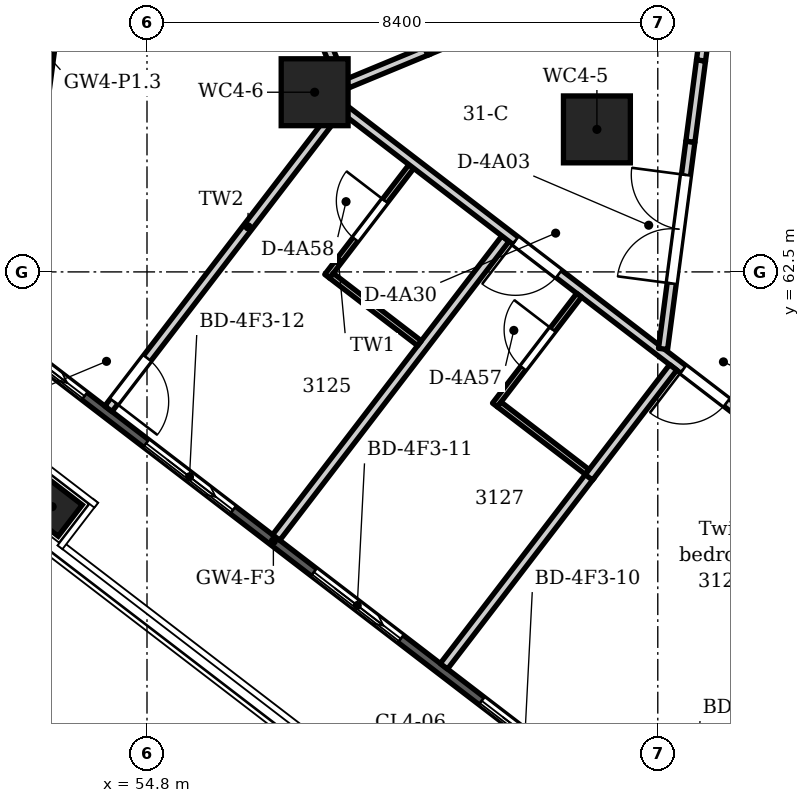
"""IFC4 building model, lengths in metres.
Left out: names, types, materials, properties, quantities, classifications, styles, units other than length and angle.
Written with IfcOpenShell. Run it as: python <this file> out.ifc"""

import sys

from ifc_helpers import new_model, si_unit, direction, frame, frame_2d, origin, origin_2d, place, context, subcontext, project, spatial, polyline, rectangle, circle, outline, extrude, element, fill, save


model = new_model("IFC4")
c1 = context("Model", 3, precision=1e-05, world=origin(), true_north=direction((0.0, 1.0)))
c2 = subcontext(c1, "Body", "Model", "MODEL_VIEW")
j1 = project(units=[si_unit("LENGTHUNIT", "METRE"), si_unit("PLANEANGLEUNIT", "RADIAN")], contexts=[c1])
p1 = place(None, origin())
s1 = spatial("IfcSite", under=j1, at=p1, CompositionType="ELEMENT")
p2 = place(p1, origin())
s2 = spatial("IfcBuilding", under=s1, at=p2, CompositionType="ELEMENT")
p3 = place(p2, frame((0.0, 0.0, 124.2)))
s3 = spatial("IfcBuildingStorey", under=s2, at=p3, CompositionType="ELEMENT", Elevation=124.2)
p4 = place(p3, frame((53.24, 58.639, -0.35), z_axis=(0.0, 0.0, 1.0), x_axis=(-0.793353340291, 0.608761429009, 0.0)))
e1 = element("IfcColumn", 1, at=p4, inside=s3, PredefinedType="COLUMN", context=c2, shape_type="SweptSolid", body=[
    extrude(rectangle(XDim=0.75, YDim=0.65, at=origin_2d()), origin(), (0.0, 0.0, 1.0), 3.95),
])
for number, where, z_axis, x_axis in (
    (2, (62.199, 64.844, -0.35), (0.0, 0.0, 1.0), (1.0, 0.0, 0.0)),
    (3, (57.557, 65.455, -0.35), (0.0, 0.0, 1.0), (1.0, 0.0, 0.0)),
):
    element("IfcColumn", number, at=place(p3, frame(where, z_axis=z_axis, x_axis=x_axis)), inside=s3, PredefinedType="COLUMN", context=c2, shape_type="SweptSolid", body=[
        extrude(circle(Radius=0.55, at=origin_2d()), origin(), (0.0, 0.0, 1.0), 3.95),
    ])
p5 = place(p3, frame((53.059, 65.038, 0.0), z_axis=(0.0, 0.0, 1.0), x_axis=(0.130492404742, 0.991449308994, 0.0)))
e4 = element("IfcWall", 4, at=p5, inside=s3, PredefinedType="SOLIDWALL", context=c2, shape_type="SweptSolid", body=[
    extrude(outline(polyline([(0.0, -0.075), (2.0, -0.075), (2.0, 0.075), (0.0, 0.075), (0.0, -0.075)])), origin(), (0.0, 0.0, 1.0), 3.3),
])
p6 = place(p3, frame((87.225, 34.786, 0.0), z_axis=(0.0, 0.0, 1.0), x_axis=(-0.793353605974, 0.608761082764, 0.0)))
e5 = element("IfcWall", 5, at=p6, inside=s3, PredefinedType="SOLIDWALL", context=c2, shape_type="SweptSolid", body=[
    extrude(outline(polyline([(0.149, 0.075), (0.149, -0.075), (45.057, -0.075), (45.057, 0.075), (0.149, 0.075)])), origin(), (0.0, 0.0, 1.0), 3.3),
])
p7 = place(p6, frame((1.239, 0.0, 0.0)))
e6 = element("IfcOpeningElement", 6, at=p7, cuts=e5, PredefinedType="OPENING", context=c2, shape_type="SweptSolid", body=[
    extrude(rectangle(XDim=1.8, YDim=2.6, at=frame_2d((0.9, 1.3))), frame((0.0, 0.085, 0.0), z_axis=(0.0, -1.0, 0.0), x_axis=(1.0, 0.0, 0.0)), (0.0, 0.0, 1.0), 0.17),
])
p8 = place(p6, frame((4.316, 0.0, 0.0)))
e7 = element("IfcOpeningElement", 7, at=p8, cuts=e5, PredefinedType="OPENING", context=c2, shape_type="SweptSolid", body=[
    extrude(rectangle(XDim=1.8, YDim=2.6, at=frame_2d((0.9, 1.3))), frame((0.0, 0.085, 0.0), z_axis=(0.0, -1.0, 0.0), x_axis=(1.0, 0.0, 0.0)), (0.0, 0.0, 1.0), 0.17),
])
p9 = place(p6, frame((7.793, 0.0, 0.0)))
e8 = element("IfcOpeningElement", 8, at=p9, cuts=e5, PredefinedType="OPENING", context=c2, shape_type="SweptSolid", body=[
    extrude(rectangle(XDim=1.8, YDim=2.6, at=frame_2d((0.9, 1.3))), frame((0.0, 0.085, 0.0), z_axis=(0.0, -1.0, 0.0), x_axis=(1.0, 0.0, 0.0)), (0.0, 0.0, 1.0), 0.17),
])
p10 = place(p6, frame((11.271, 0.0, 0.0)))
e9 = element("IfcOpeningElement", 9, at=p10, cuts=e5, PredefinedType="OPENING", context=c2, shape_type="SweptSolid", body=[
    extrude(rectangle(XDim=1.8, YDim=2.6, at=frame_2d((0.9, 1.3))), frame((0.0, 0.085, 0.0), z_axis=(0.0, -1.0, 0.0), x_axis=(1.0, 0.0, 0.0)), (0.0, 0.0, 1.0), 0.17),
])
p11 = place(p6, frame((14.748, 0.0, 0.0)))
e10 = element("IfcOpeningElement", 10, at=p11, cuts=e5, PredefinedType="OPENING", context=c2, shape_type="SweptSolid", body=[
    extrude(rectangle(XDim=1.8, YDim=2.6, at=frame_2d((0.9, 1.3))), frame((0.0, 0.085, 0.0), z_axis=(0.0, -1.0, 0.0), x_axis=(1.0, 0.0, 0.0)), (0.0, 0.0, 1.0), 0.17),
])
p12 = place(p6, frame((18.226, 0.0, 0.0)))
e11 = element("IfcOpeningElement", 11, at=p12, cuts=e5, PredefinedType="OPENING", context=c2, shape_type="SweptSolid", body=[
    extrude(rectangle(XDim=1.8, YDim=2.6, at=frame_2d((0.9, 1.3))), frame((0.0, 0.085, 0.0), z_axis=(0.0, -1.0, 0.0), x_axis=(1.0, 0.0, 0.0)), (0.0, 0.0, 1.0), 0.17),
])
p13 = place(p6, frame((21.703, 0.0, 0.0)))
e12 = element("IfcOpeningElement", 12, at=p13, cuts=e5, PredefinedType="OPENING", context=c2, shape_type="SweptSolid", body=[
    extrude(rectangle(XDim=1.8, YDim=2.6, at=frame_2d((0.9, 1.3))), frame((0.0, 0.085, 0.0), z_axis=(0.0, -1.0, 0.0), x_axis=(1.0, 0.0, 0.0)), (0.0, 0.0, 1.0), 0.17),
])
p14 = place(p6, frame((25.18, 0.0, 0.0)))
e13 = element("IfcOpeningElement", 13, at=p14, cuts=e5, PredefinedType="OPENING", context=c2, shape_type="SweptSolid", body=[
    extrude(rectangle(XDim=1.8, YDim=2.6, at=frame_2d((0.9, 1.3))), frame((0.0, 0.085, 0.0), z_axis=(0.0, -1.0, 0.0), x_axis=(1.0, 0.0, 0.0)), (0.0, 0.0, 1.0), 0.17),
])
p15 = place(p6, frame((28.658, 0.0, 0.0)))
e14 = element("IfcOpeningElement", 14, at=p15, cuts=e5, PredefinedType="OPENING", context=c2, shape_type="SweptSolid", body=[
    extrude(rectangle(XDim=1.8, YDim=2.6, at=frame_2d((0.9, 1.3))), frame((0.0, 0.085, 0.0), z_axis=(0.0, -1.0, 0.0), x_axis=(1.0, 0.0, 0.0)), (0.0, 0.0, 1.0), 0.17),
])
p16 = place(p6, frame((32.135, 0.0, 0.0)))
e15 = element("IfcOpeningElement", 15, at=p16, cuts=e5, PredefinedType="OPENING", context=c2, shape_type="SweptSolid", body=[
    extrude(rectangle(XDim=1.8, YDim=2.6, at=frame_2d((0.9, 1.3))), frame((0.0, 0.085, 0.0), z_axis=(0.0, -1.0, 0.0), x_axis=(1.0, 0.0, 0.0)), (0.0, 0.0, 1.0), 0.17),
])
p17 = place(p6, frame((35.613, 0.0, 0.0)))
e16 = element("IfcOpeningElement", 16, at=p17, cuts=e5, PredefinedType="OPENING", context=c2, shape_type="SweptSolid", body=[
    extrude(rectangle(XDim=1.8, YDim=2.6, at=frame_2d((0.9, 1.3))), frame((0.0, 0.085, 0.0), z_axis=(0.0, -1.0, 0.0), x_axis=(1.0, 0.0, 0.0)), (0.0, 0.0, 1.0), 0.17),
])
p18 = place(p6, frame((39.09, 0.0, 0.0)))
e17 = element("IfcOpeningElement", 17, at=p18, cuts=e5, PredefinedType="OPENING", context=c2, shape_type="SweptSolid", body=[
    extrude(rectangle(XDim=1.8, YDim=2.6, at=frame_2d((0.9, 1.3))), frame((0.0, 0.085, 0.0), z_axis=(0.0, -1.0, 0.0), x_axis=(1.0, 0.0, 0.0)), (0.0, 0.0, 1.0), 0.17),
])
p19 = place(p6, frame((42.167, 0.0, 0.0)))
e18 = element("IfcOpeningElement", 18, at=p19, cuts=e5, PredefinedType="OPENING", context=c2, shape_type="SweptSolid", body=[
    extrude(rectangle(XDim=1.8, YDim=2.6, at=frame_2d((0.9, 1.3))), frame((0.0, 0.085, 0.0), z_axis=(0.0, -1.0, 0.0), x_axis=(1.0, 0.0, 0.0)), (0.0, 0.0, 1.0), 0.17),
])
p20 = place(p3, frame((54.165, 60.249, 0.0), z_axis=(0.0, 0.0, 1.0), x_axis=(0.608817658648, 0.793310190605, 0.0)))
e19 = element("IfcWall", 19, at=p20, inside=s3, PredefinedType="PARTITIONING", context=c2, shape_type="SweptSolid", body=[
    extrude(rectangle(XDim=6.344, YDim=0.15, at=frame_2d((3.172, 0.0))), origin(), (0.0, 0.0, 1.0), 2.8),
])
p21 = place(p20, frame((0.15, 0.0, 0.0)))
e20 = element("IfcOpeningElement", 20, at=p21, cuts=e19, PredefinedType="OPENING", context=c2, shape_type="SweptSolid", body=[
    extrude(rectangle(XDim=0.9, YDim=2.1, at=frame_2d((0.45, 1.05))), frame((0.0, 0.085, 0.0), z_axis=(0.0, -1.0, 0.0), x_axis=(1.0, 0.0, 0.0)), (0.0, 0.0, 1.0), 0.17),
])
p22 = place(p3, frame((55.628, 71.361, 0.0), z_axis=(0.0, 0.0, 1.0), x_axis=(0.38260330851, -0.923912716828, 0.0)))
e21 = element("IfcWall", 21, at=p22, inside=s3, PredefinedType="PARTITIONING", context=c2, shape_type="SweptSolid", body=[
    extrude(rectangle(XDim=6.344, YDim=0.15, at=frame_2d((3.172, 0.0))), origin(), (0.0, 0.0, 1.0), 2.8),
])
p23 = place(p22, frame((0.15, 0.0, 0.0)))
e22 = element("IfcOpeningElement", 22, at=p23, cuts=e21, PredefinedType="OPENING", context=c2, shape_type="SweptSolid", body=[
    extrude(rectangle(XDim=0.9, YDim=2.1, at=frame_2d((0.45, 1.05))), frame((0.0, 0.085, 0.0), z_axis=(0.0, -1.0, 0.0), x_axis=(1.0, 0.0, 0.0)), (0.0, 0.0, 1.0), 0.17),
])
p24 = place(p3, frame((56.924, 58.132, 0.0), z_axis=(0.0, 0.0, 1.0), x_axis=(0.608635904236, 0.793449643062, 0.0)))
e23 = element("IfcWall", 23, at=p24, inside=s3, PredefinedType="PARTITIONING", context=c2, shape_type="SweptSolid", body=[
    extrude(rectangle(XDim=6.194, YDim=0.15, at=frame_2d((3.097, 0.0))), origin(), (0.0, 0.0, 1.0), 3.3),
])
p25 = place(p3, frame((57.763, 62.428, 0.0), z_axis=(0.0, 0.0, 1.0), x_axis=(0.608652294224, 0.793437070432, 0.0)))
e24 = element("IfcWall", 24, at=p25, inside=s3, PredefinedType="PARTITIONING", context=c2, shape_type="SweptSolid", body=[
    extrude(rectangle(XDim=2.275, YDim=0.1, at=frame_2d((1.138, 0.0))), origin(), (0.0, 0.0, 1.0), 3.3),
])
p26 = place(p25, frame((0.762, 0.0, 0.0)))
e25 = element("IfcOpeningElement", 25, at=p26, cuts=e24, PredefinedType="OPENING", context=c2, shape_type="SweptSolid", body=[
    extrude(rectangle(XDim=0.8, YDim=2.1, at=frame_2d((0.4, 1.05))), frame((0.0, 0.06, 0.0), z_axis=(0.0, -1.0, 0.0), x_axis=(1.0, 0.0, 0.0)), (0.0, 0.0, 1.0), 0.12),
])
p27 = place(p3, frame((57.833, 62.438, 0.0), z_axis=(0.0, 0.0, 1.0), x_axis=(0.793369431695, -0.608740457709, 0.0)))
e26 = element("IfcWall", 26, at=p27, inside=s3, PredefinedType="PARTITIONING", context=c2, shape_type="SweptSolid", body=[
    extrude(rectangle(XDim=1.825, YDim=0.1, at=frame_2d((0.912, 0.0))), origin(), (0.0, 0.0, 1.0), 3.3),
])
p28 = place(p3, frame((58.042, 65.176, 0.0), z_axis=(0.0, 0.0, 1.0), x_axis=(0.793390311924, -0.608713243609, 0.0)))
e27 = element("IfcWall", 27, at=p28, inside=s3, PredefinedType="PARTITIONING", context=c2, shape_type="SweptSolid", body=[
    extrude(rectangle(XDim=17.064, YDim=0.15, at=frame_2d((8.532, 0.0))), origin(), (0.0, 0.0, 1.0), 2.8),
])
p29 = place(p28, frame((7.029, 0.0, 0.0)))
e28 = element("IfcOpeningElement", 28, at=p29, cuts=e27, PredefinedType="OPENING", context=c2, shape_type="SweptSolid", body=[
    extrude(rectangle(XDim=0.9, YDim=2.1, at=frame_2d((0.45, 1.05))), frame((0.0, 0.085, 0.0), z_axis=(0.0, -1.0, 0.0), x_axis=(1.0, 0.0, 0.0)), (0.0, 0.0, 1.0), 0.17),
])
p30 = place(p28, frame((3.551, 0.0, 0.0)))
e29 = element("IfcOpeningElement", 29, at=p30, cuts=e27, PredefinedType="OPENING", context=c2, shape_type="SweptSolid", body=[
    extrude(rectangle(XDim=0.9, YDim=2.1, at=frame_2d((0.45, 1.05))), frame((0.0, 0.085, 0.0), z_axis=(0.0, -1.0, 0.0), x_axis=(1.0, 0.0, 0.0)), (0.0, 0.0, 1.0), 0.17),
])
p31 = place(p3, frame((58.096, 65.598, 0.0), z_axis=(0.0, 0.0, 1.0), x_axis=(0.923888134281, 0.382662665196, 0.0)))
e30 = element("IfcWall", 30, at=p31, inside=s3, PredefinedType="PARTITIONING", context=c2, shape_type="SweptSolid", body=[
    extrude(rectangle(XDim=1.457, YDim=0.15, at=frame_2d((0.728, 0.0))), origin(), (0.0, 0.0, 1.0), 2.8),
])
p32 = place(p3, frame((59.389, 66.133, 0.0), z_axis=(0.0, 0.0, 1.0), x_axis=(0.923817799338, 0.382832435442, 0.0)))
e31 = element("IfcWall", 31, at=p32, inside=s3, PredefinedType="PARTITIONING", context=c2, shape_type="SweptSolid", body=[
    extrude(rectangle(XDim=2.004, YDim=0.15, at=frame_2d((1.002, 0.0))), origin(), (0.0, 0.0, 1.0), 3.3),
])
p33 = place(p3, frame((59.682, 56.015, 0.0), z_axis=(0.0, 0.0, 1.0), x_axis=(0.608733348698, 0.793374886282, 0.0)))
e32 = element("IfcWall", 32, at=p33, inside=s3, PredefinedType="PARTITIONING", context=c2, shape_type="SweptSolid", body=[
    extrude(rectangle(XDim=3.973, YDim=0.15, at=frame_2d((1.987, 0.0))), origin(), (0.0, 0.0, 1.0), 3.3),
])
p34 = place(p3, frame((60.521, 60.311, 0.0), z_axis=(0.0, 0.0, 1.0), x_axis=(0.608719842686, 0.793385248867, 0.0)))
e33 = element("IfcWall", 33, at=p34, inside=s3, PredefinedType="PARTITIONING", context=c2, shape_type="SweptSolid", body=[
    extrude(rectangle(XDim=2.275, YDim=0.1, at=frame_2d((1.138, 0.0))), origin(), (0.0, 0.0, 1.0), 3.3),
])
p35 = place(p34, frame((0.762, 0.0, 0.0)))
e34 = element("IfcOpeningElement", 34, at=p35, cuts=e33, PredefinedType="OPENING", context=c2, shape_type="SweptSolid", body=[
    extrude(rectangle(XDim=0.8, YDim=2.1, at=frame_2d((0.4, 1.05))), frame((0.0, 0.06, 0.0), z_axis=(0.0, -1.0, 0.0), x_axis=(1.0, 0.0, 0.0)), (0.0, 0.0, 1.0), 0.12),
])
p36 = place(p3, frame((60.592, 60.321, 0.0), z_axis=(0.0, 0.0, 1.0), x_axis=(0.793369431695, -0.608740457709, 0.0)))
e35 = element("IfcWall", 35, at=p36, inside=s3, PredefinedType="PARTITIONING", context=c2, shape_type="SweptSolid", body=[
    extrude(rectangle(XDim=1.825, YDim=0.1, at=frame_2d((0.912, 0.0))), origin(), (0.0, 0.0, 1.0), 3.3),
])
p37 = place(p3, frame((62.067, 59.121, 0.0), z_axis=(0.0, 0.0, 1.0), x_axis=(0.608570992326, 0.793499431191, 0.0)))
e36 = element("IfcWall", 36, at=p37, inside=s3, PredefinedType="PARTITIONING", context=c2, shape_type="SweptSolid", body=[
    extrude(rectangle(XDim=2.279, YDim=0.15, at=frame_2d((1.139, 0.0))), origin(), (0.0, 0.0, 1.0), 3.3),
])
p38 = place(p3, frame((63.287, 61.233, 0.0), z_axis=(0.0, 0.0, 1.0), x_axis=(0.130693367383, 0.991422838007, 0.0)))
e37 = element("IfcWall", 37, at=p38, inside=s3, PredefinedType="PARTITIONING", context=c2, shape_type="SweptSolid", body=[
    extrude(rectangle(XDim=3.437, YDim=0.15, at=frame_2d((1.719, 0.0))), origin(), (0.0, 0.0, 1.0), 2.7),
])
p39 = place(p38, frame((1.086, 0.0, 0.0)))
e38 = element("IfcOpeningElement", 38, at=p39, cuts=e37, PredefinedType="OPENING", context=c2, shape_type="SweptSolid", body=[
    extrude(rectangle(XDim=1.8, YDim=2.1, at=frame_2d((0.9, 1.05))), frame((0.0, 0.085, 0.0), z_axis=(0.0, -1.0, 0.0), x_axis=(1.0, 0.0, 0.0)), (0.0, 0.0, 1.0), 0.17),
])
p40 = place(p3, frame((63.736, 64.641, 0.0), z_axis=(0.0, 0.0, 1.0), x_axis=(0.129741998441, 0.991547786968, 0.0)))
e39 = element("IfcWall", 39, at=p40, inside=s3, PredefinedType="PARTITIONING", context=c2, shape_type="SweptSolid", body=[
    extrude(rectangle(XDim=1.347, YDim=0.15, at=frame_2d((0.674, 0.0))), origin(), (0.0, 0.0, 1.0), 2.7),
])
p41 = place(p3, frame((63.911, 65.977, 0.0), z_axis=(0.0, 0.0, 1.0), x_axis=(0.13074768898, 0.9914156756, 0.0)))
e40 = element("IfcWall", 40, at=p41, inside=s3, PredefinedType="PARTITIONING", context=c2, shape_type="SweptSolid", body=[
    extrude(rectangle(XDim=2.089, YDim=0.15, at=frame_2d((1.045, 0.0))), origin(), (0.0, 0.0, 1.0), 3.3),
])
p42 = place(p16, origin())
e41 = element("IfcDoor", 41, at=p42, inside=s3, OperationType="SLIDING_TO_LEFT", PredefinedType="DOOR", context=c2, shape_type="SweptSolid", body=[
    extrude(rectangle(XDim=1.8, YDim=2.6, at=frame_2d((0.9, 1.3))), frame((0.0, 0.025, 0.0), z_axis=(0.0, -1.0, 0.0), x_axis=(1.0, 0.0, 0.0)), (0.0, 0.0, 1.0), 0.05),
])
fill(e15, e41)
p43 = place(p17, origin())
e42 = element("IfcDoor", 42, at=p43, inside=s3, OperationType="SLIDING_TO_LEFT", PredefinedType="DOOR", context=c2, shape_type="SweptSolid", body=[
    extrude(rectangle(XDim=1.8, YDim=2.6, at=frame_2d((0.9, 1.3))), frame((0.0, 0.025, 0.0), z_axis=(0.0, -1.0, 0.0), x_axis=(1.0, 0.0, 0.0)), (0.0, 0.0, 1.0), 0.05),
])
fill(e16, e42)
p44 = place(p18, origin())
e43 = element("IfcDoor", 43, at=p44, inside=s3, OperationType="SLIDING_TO_LEFT", PredefinedType="DOOR", context=c2, shape_type="SweptSolid", body=[
    extrude(rectangle(XDim=1.8, YDim=2.6, at=frame_2d((0.9, 1.3))), frame((0.0, 0.025, 0.0), z_axis=(0.0, -1.0, 0.0), x_axis=(1.0, 0.0, 0.0)), (0.0, 0.0, 1.0), 0.05),
])
fill(e17, e43)
p45 = place(p19, origin())
e44 = element("IfcDoor", 44, at=p45, inside=s3, OperationType="SLIDING_TO_LEFT", PredefinedType="DOOR", context=c2, shape_type="SweptSolid", body=[
    extrude(rectangle(XDim=1.8, YDim=2.6, at=frame_2d((0.9, 1.3))), frame((0.0, 0.025, 0.0), z_axis=(0.0, -1.0, 0.0), x_axis=(1.0, 0.0, 0.0)), (0.0, 0.0, 1.0), 0.05),
])
fill(e18, e44)
p46 = place(p39, origin())
e45 = element("IfcDoor", 45, at=p46, inside=s3, OperationType="DOUBLE_DOOR_DOUBLE_SWING", PredefinedType="DOOR", context=c2, shape_type="SweptSolid", body=[
    extrude(rectangle(XDim=1.8, YDim=2.1, at=frame_2d((0.9, 1.05))), frame((0.0, 0.025, 0.0), z_axis=(0.0, -1.0, 0.0), x_axis=(1.0, 0.0, 0.0)), (0.0, 0.0, 1.0), 0.05),
])
fill(e38, e45)
p47 = place(p29, frame((0.9, 0.0, 0.0), z_axis=(0.0, 0.0, 1.0), x_axis=(-1.0, 0.0, 0.0)))
e46 = element("IfcDoor", 46, at=p47, inside=s3, OperationType="SINGLE_SWING_RIGHT", PredefinedType="DOOR", context=c2, shape_type="SweptSolid", body=[
    extrude(rectangle(XDim=0.9, YDim=2.1, at=frame_2d((0.45, 1.05))), frame((0.0, 0.025, 0.0), z_axis=(0.0, -1.0, 0.0), x_axis=(1.0, 0.0, 0.0)), (0.0, 0.0, 1.0), 0.05),
])
fill(e28, e46)
p48 = place(p30, frame((0.9, 0.0, 0.0), z_axis=(0.0, 0.0, 1.0), x_axis=(-1.0, 0.0, 0.0)))
e47 = element("IfcDoor", 47, at=p48, inside=s3, OperationType="SINGLE_SWING_RIGHT", PredefinedType="DOOR", context=c2, shape_type="SweptSolid", body=[
    extrude(rectangle(XDim=0.9, YDim=2.1, at=frame_2d((0.45, 1.05))), frame((0.0, 0.025, 0.0), z_axis=(0.0, -1.0, 0.0), x_axis=(1.0, 0.0, 0.0)), (0.0, 0.0, 1.0), 0.05),
])
fill(e29, e47)
p49 = place(p21, frame((0.9, 0.0, 0.0), z_axis=(0.0, 0.0, 1.0), x_axis=(-1.0, 0.0, 0.0)))
e48 = element("IfcDoor", 48, at=p49, inside=s3, OperationType="SINGLE_SWING_RIGHT", PredefinedType="DOOR", context=c2, shape_type="SweptSolid", body=[
    extrude(rectangle(XDim=0.9, YDim=2.1, at=frame_2d((0.45, 1.05))), frame((0.0, 0.025, 0.0), z_axis=(0.0, -1.0, 0.0), x_axis=(1.0, 0.0, 0.0)), (0.0, 0.0, 1.0), 0.05),
])
fill(e20, e48)
p50 = place(p35, origin())
e49 = element("IfcDoor", 49, at=p50, inside=s3, OperationType="SINGLE_SWING_RIGHT", PredefinedType="DOOR", context=c2, shape_type="SweptSolid", body=[
    extrude(rectangle(XDim=0.8, YDim=2.1, at=frame_2d((0.4, 1.05))), frame((0.0, 0.025, 0.0), z_axis=(0.0, -1.0, 0.0), x_axis=(1.0, 0.0, 0.0)), (0.0, 0.0, 1.0), 0.05),
])
fill(e34, e49)
p51 = place(p26, origin())
e50 = element("IfcDoor", 50, at=p51, inside=s3, OperationType="SINGLE_SWING_RIGHT", PredefinedType="DOOR", context=c2, shape_type="SweptSolid", body=[
    extrude(rectangle(XDim=0.8, YDim=2.1, at=frame_2d((0.4, 1.05))), frame((0.0, 0.025, 0.0), z_axis=(0.0, -1.0, 0.0), x_axis=(1.0, 0.0, 0.0)), (0.0, 0.0, 1.0), 0.05),
])
fill(e25, e50)
save(model, sys.argv[1])
